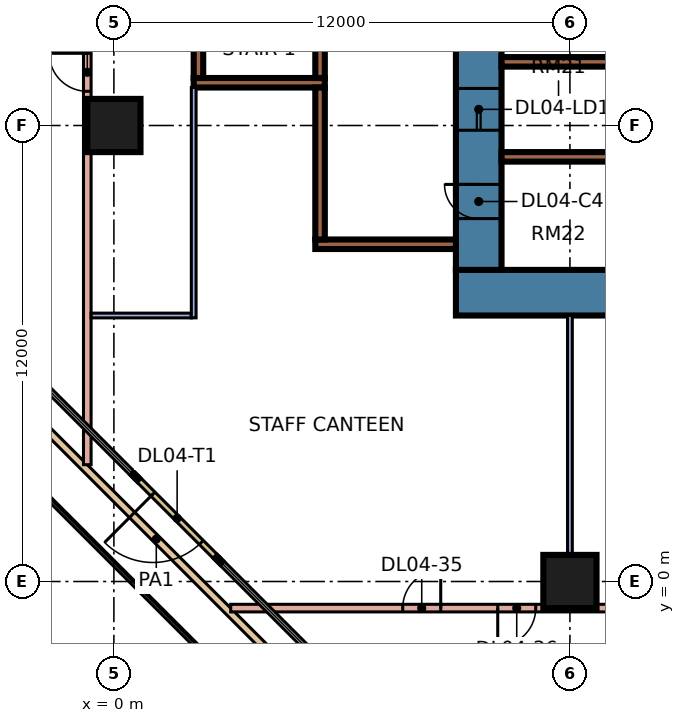
"""IFC4 building model, lengths in metres.
Left out: names, types, materials, properties, quantities, classifications, styles, units other than length and angle.
Written with IfcOpenShell. Run it as: python <this file> out.ifc"""

import sys

from ifc_helpers import new_model, si_unit, direction, frame, frame_2d, origin, origin_2d, place, context, subcontext, project, spatial, rectangle, extrude, element, fill, save


model = new_model("IFC4")
c1 = context("Model", 3, precision=1e-05, world=origin(), true_north=direction((0.0, 1.0)))
c2 = subcontext(c1, "Body", "Model", "MODEL_VIEW")
j1 = project(units=[si_unit("LENGTHUNIT", "METRE"), si_unit("PLANEANGLEUNIT", "RADIAN")], contexts=[c1])
p1 = place(None, origin())
s1 = spatial("IfcSite", under=j1, at=p1, CompositionType="ELEMENT")
p2 = place(p1, origin())
s2 = spatial("IfcBuilding", under=s1, at=p2, CompositionType="ELEMENT")
p3 = place(p2, frame((0.0, 0.0, 21.6)))
s3 = spatial("IfcBuildingStorey", under=s2, at=p3, CompositionType="ELEMENT", Elevation=21.6)
for number, where, z_axis, x_axis in (
    (1, (12.0, 0.0, 0.0), (0.0, 0.0, 1.0), (1.0, 0.0, 0.0)),
    (2, (0.0, 12.0, 0.0), (0.0, 0.0, 1.0), (1.0, 0.0, 0.0)),
):
    element("IfcColumn", number, at=place(p3, frame(where, z_axis=z_axis, x_axis=x_axis)), inside=s3, PredefinedType="COLUMN", context=c2, shape_type="SweptSolid", body=[
        extrude(rectangle(XDim=1.4, YDim=1.4, at=origin_2d()), origin(), (0.0, 0.0, 1.0), 4.8),
    ])
p4 = place(p3, frame((9.0, 7.6, 0.0), z_axis=(0.0, 0.0, 1.0), x_axis=(1.0, 0.0, 0.0)))
e3 = element("IfcWall", 3, at=p4, inside=s3, PredefinedType="SHEAR", context=c2, shape_type="SweptSolid", body=[
    extrude(rectangle(XDim=25.0, YDim=1.2, at=frame_2d((12.5, 0.0))), origin(), (0.0, 0.0, 1.0), 4.8),
])
p5 = place(p3, frame((9.6, 8.2, 0.0), z_axis=(0.0, 0.0, 1.0), x_axis=(0.0, 1.0, 0.0)))
e4 = element("IfcWall", 4, at=p5, inside=s3, PredefinedType="SHEAR", context=c2, shape_type="SweptSolid", body=[
    extrude(rectangle(XDim=10.6, YDim=1.2, at=frame_2d((5.3, 0.0))), origin(), (0.0, 0.0, 1.0), 4.8),
])
p6 = place(p5, frame((3.675, 0.0, 0.0)))
e5 = element("IfcOpeningElement", 5, at=p6, cuts=e4, PredefinedType="OPENING", context=c2, shape_type="SweptSolid", body=[
    extrude(rectangle(XDim=1.1, YDim=2.2, at=frame_2d((0.55, 1.1))), frame((0.0, 0.61, 0.0), z_axis=(0.0, -1.0, 0.0), x_axis=(1.0, 0.0, 0.0)), (0.0, 0.0, 1.0), 1.22),
])
p7 = place(p5, frame((6.175, 0.0, 0.0)))
e6 = element("IfcOpeningElement", 6, at=p7, cuts=e4, PredefinedType="OPENING", context=c2, shape_type="SweptSolid", body=[
    extrude(rectangle(XDim=1.1, YDim=2.2, at=frame_2d((0.55, 1.1))), frame((0.0, 0.61, 0.0), z_axis=(0.0, -1.0, 0.0), x_axis=(1.0, 0.0, 0.0)), (0.0, 0.0, 1.0), 1.22),
])
p8 = place(p5, frame((8.8, 0.0, 0.0)))
e7 = element("IfcOpeningElement", 7, at=p8, cuts=e4, PredefinedType="OPENING", context=c2, shape_type="SweptSolid", body=[
    extrude(rectangle(XDim=1.1, YDim=2.2, at=frame_2d((0.55, 1.1))), frame((0.0, 0.61, 0.0), z_axis=(0.0, -1.0, 0.0), x_axis=(1.0, 0.0, 0.0)), (0.0, 0.0, 1.0), 1.22),
])
p9 = place(p5, frame((1.35, 0.0, 0.0)))
e8 = element("IfcOpeningElement", 8, at=p9, cuts=e4, PredefinedType="OPENING", context=c2, shape_type="SweptSolid", body=[
    extrude(rectangle(XDim=0.9, YDim=2.1, at=frame_2d((0.45, 1.05))), frame((0.0, 0.61, 0.0), z_axis=(0.0, -1.0, 0.0), x_axis=(1.0, 0.0, 0.0)), (0.0, 0.0, 1.0), 1.22),
])
for number, where, z_axis, x_axis in (
    (9, (10.2, 11.175, 0.0), (0.0, 0.0, 1.0), (1.0, 0.0, 0.0)),
    (10, (10.2, 13.675, 0.0), (0.0, 0.0, 1.0), (1.0, 0.0, 0.0)),
):
    element("IfcWall", number, at=place(p3, frame(where, z_axis=z_axis, x_axis=x_axis)), inside=s3, PredefinedType="SHEAR", context=c2, shape_type="SweptSolid", body=[
        extrude(rectangle(XDim=3.0, YDim=0.25, at=frame_2d((1.5, 0.0))), origin(), (0.0, 0.0, 1.0), 4.8),
    ])
p10 = place(p3, frame((2.1, 13.125, 0.0), z_axis=(0.0, 0.0, 1.0), x_axis=(1.0, 0.0, 0.0)))
e11 = element("IfcWall", 11, at=p10, inside=s3, PredefinedType="SHEAR", context=c2, shape_type="SweptSolid", body=[
    extrude(rectangle(XDim=3.45, YDim=0.25, at=frame_2d((1.725, 0.0))), origin(), (0.0, 0.0, 1.0), 4.8),
])
p11 = place(p3, frame((2.225, 13.25, 0.0), z_axis=(0.0, 0.0, 1.0), x_axis=(0.0, 1.0, 0.0)))
e12 = element("IfcWall", 12, at=p11, inside=s3, PredefinedType="SHEAR", context=c2, shape_type="SweptSolid", body=[
    extrude(rectangle(XDim=6.5, YDim=0.25, at=frame_2d((3.25, 0.0))), origin(), (0.0, 0.0, 1.0), 4.8),
])
p12 = place(p3, frame((5.425, 13.25, 0.0), z_axis=(0.0, 0.0, 1.0), x_axis=(0.0, 1.0, 0.0)))
e13 = element("IfcWall", 13, at=p12, inside=s3, PredefinedType="SHEAR", context=c2, shape_type="SweptSolid", body=[
    extrude(rectangle(XDim=6.5, YDim=0.25, at=frame_2d((3.25, 0.0))), origin(), (0.0, 0.0, 1.0), 4.8),
])
p13 = place(p12, frame((5.25, 0.0, 0.0)))
e14 = element("IfcOpeningElement", 14, at=p13, cuts=e13, PredefinedType="OPENING", context=c2, shape_type="SweptSolid", body=[
    extrude(rectangle(XDim=1.1, YDim=2.2, at=frame_2d((0.55, 1.1))), frame((0.0, 0.135, 0.0), z_axis=(0.0, -1.0, 0.0), x_axis=(1.0, 0.0, 0.0)), (0.0, 0.0, 1.0), 0.27),
])
p14 = place(p3, frame((5.3, 8.875, 0.0), z_axis=(0.0, 0.0, 1.0), x_axis=(1.0, 0.0, 0.0)))
e15 = element("IfcWall", 15, at=p14, inside=s3, PredefinedType="SHEAR", context=c2, shape_type="SweptSolid", body=[
    extrude(rectangle(XDim=3.7, YDim=0.25, at=frame_2d((1.85, 0.0))), origin(), (0.0, 0.0, 1.0), 4.8),
])
p15 = place(p3, frame((5.425, 9.0, 0.0), z_axis=(0.0, 0.0, 1.0), x_axis=(0.0, 1.0, 0.0)))
e16 = element("IfcWall", 16, at=p15, inside=s3, PredefinedType="SHEAR", context=c2, shape_type="SweptSolid", body=[
    extrude(rectangle(XDim=4.0, YDim=0.25, at=frame_2d((2.0, 0.0))), origin(), (0.0, 0.0, 1.0), 4.8),
])
p16 = place(p3, frame((0.603, 2.725, 0.0), z_axis=(0.0, 0.0, 1.0), x_axis=(0.707106781187, -0.707106781187, 0.0)))
e17 = element("IfcWall", 17, at=p16, inside=s3, PredefinedType="SOLIDWALL", context=c2, shape_type="SweptSolid", body=[
    extrude(rectangle(XDim=3.0, YDim=0.15, at=frame_2d((1.5, 0.0))), origin(), (0.0, 0.0, 1.0), 4.4),
])
p17 = place(p16, frame((0.6, 0.0, 0.0)))
e18 = element("IfcOpeningElement", 18, at=p17, cuts=e17, PredefinedType="OPENING", context=c2, shape_type="SweptSolid", body=[
    extrude(rectangle(XDim=1.8, YDim=2.4, at=frame_2d((0.9, 1.2))), frame((0.0, 0.085, 0.0), z_axis=(0.0, -1.0, 0.0), x_axis=(1.0, 0.0, 0.0)), (0.0, 0.0, 1.0), 0.17),
])
p18 = place(p3, frame((9.932, -7.7, 0.0), z_axis=(0.0, 0.0, 1.0), x_axis=(-0.707106781187, 0.707106781187, 0.0)))
e19 = element("IfcWall", 19, at=p18, inside=s3, PredefinedType="PARAPET", context=c2, shape_type="SweptSolid", body=[
    extrude(rectangle(XDim=24.935, YDim=0.2, at=frame_2d((12.468, 0.0))), origin(), (0.0, 0.0, 1.0), 0.5),
])
p19 = place(p3, frame((-0.7, 3.073, 0.0), z_axis=(0.0, 0.0, 1.0), x_axis=(0.0, 1.0, 0.0)))
e20 = element("IfcWall", 20, at=p19, inside=s3, PredefinedType="PARTITIONING", context=c2, shape_type="SweptSolid", body=[
    extrude(rectangle(XDim=19.927, YDim=0.2, at=frame_2d((9.963, 0.0))), origin(), (0.0, 0.0, 1.0), 4.4),
])
p20 = place(p19, frame((17.577, 0.0, 0.0)))
e21 = element("IfcOpeningElement", 21, at=p20, cuts=e20, PredefinedType="OPENING", context=c2, shape_type="SweptSolid", body=[
    extrude(rectangle(XDim=1.8, YDim=2.1, at=frame_2d((0.9, 1.05))), frame((0.0, 0.11, 0.0), z_axis=(0.0, -1.0, 0.0), x_axis=(1.0, 0.0, 0.0)), (0.0, 0.0, 1.0), 0.22),
])
p21 = place(p19, frame((9.827, 0.0, 0.0)))
e22 = element("IfcOpeningElement", 22, at=p21, cuts=e20, PredefinedType="OPENING", context=c2, shape_type="SweptSolid", body=[
    extrude(rectangle(XDim=1.0, YDim=2.1, at=frame_2d((0.5, 1.05))), frame((0.0, 0.11, 0.0), z_axis=(0.0, -1.0, 0.0), x_axis=(1.0, 0.0, 0.0)), (0.0, 0.0, 1.0), 0.22),
])
p22 = place(p3, frame((-0.6, 7.0, 0.0), z_axis=(0.0, 0.0, 1.0), x_axis=(1.0, 0.0, 0.0)))
e23 = element("IfcWall", 23, at=p22, inside=s3, PredefinedType="PARTITIONING", context=c2, shape_type="SweptSolid", body=[
    extrude(rectangle(XDim=2.638, YDim=0.125, at=frame_2d((1.319, 0.0))), origin(), (0.0, 0.0, 1.0), 4.4),
])
p23 = place(p3, frame((2.1, 6.938, 0.0), z_axis=(0.0, 0.0, 1.0), x_axis=(0.0, 1.0, 0.0)))
e24 = element("IfcWall", 24, at=p23, inside=s3, PredefinedType="PARTITIONING", context=c2, shape_type="SweptSolid", body=[
    extrude(rectangle(XDim=6.062, YDim=0.125, at=frame_2d((3.031, 0.0))), origin(), (0.0, 0.0, 1.0), 4.4),
])
p24 = place(p3, frame((3.073, -0.7, 0.0), z_axis=(0.0, 0.0, 1.0), x_axis=(1.0, 0.0, 0.0)))
e25 = element("IfcWall", 25, at=p24, inside=s3, PredefinedType="PARTITIONING", context=c2, shape_type="SweptSolid", body=[
    extrude(rectangle(XDim=41.927, YDim=0.2, at=frame_2d((20.963, 0.0))), origin(), (0.0, 0.0, 1.0), 4.4),
])
p25 = place(p24, frame((36.027, 0.0, 0.0)))
e26 = element("IfcOpeningElement", 26, at=p25, cuts=e25, PredefinedType="OPENING", context=c2, shape_type="SweptSolid", body=[
    extrude(rectangle(XDim=1.0, YDim=2.1, at=frame_2d((0.5, 1.05))), frame((0.0, 0.11, 0.0), z_axis=(0.0, -1.0, 0.0), x_axis=(1.0, 0.0, 0.0)), (0.0, 0.0, 1.0), 0.22),
])
p26 = place(p24, frame((4.527, 0.0, 0.0)))
e27 = element("IfcOpeningElement", 27, at=p26, cuts=e25, PredefinedType="OPENING", context=c2, shape_type="SweptSolid", body=[
    extrude(rectangle(XDim=1.0, YDim=2.1, at=frame_2d((0.5, 1.05))), frame((0.0, 0.11, 0.0), z_axis=(0.0, -1.0, 0.0), x_axis=(1.0, 0.0, 0.0)), (0.0, 0.0, 1.0), 0.22),
])
p27 = place(p24, frame((7.027, 0.0, 0.0)))
e28 = element("IfcOpeningElement", 28, at=p27, cuts=e25, PredefinedType="OPENING", context=c2, shape_type="SweptSolid", body=[
    extrude(rectangle(XDim=1.0, YDim=2.1, at=frame_2d((0.5, 1.05))), frame((0.0, 0.11, 0.0), z_axis=(0.0, -1.0, 0.0), x_axis=(1.0, 0.0, 0.0)), (0.0, 0.0, 1.0), 0.22),
])
p28 = place(p24, frame((14.527, 0.0, 0.0)))
e29 = element("IfcOpeningElement", 29, at=p28, cuts=e25, PredefinedType="OPENING", context=c2, shape_type="SweptSolid", body=[
    extrude(rectangle(XDim=1.0, YDim=2.1, at=frame_2d((0.5, 1.05))), frame((0.0, 0.11, 0.0), z_axis=(0.0, -1.0, 0.0), x_axis=(1.0, 0.0, 0.0)), (0.0, 0.0, 1.0), 0.22),
])
p29 = place(p24, frame((25.527, 0.0, 0.0)))
e30 = element("IfcOpeningElement", 30, at=p29, cuts=e25, PredefinedType="OPENING", context=c2, shape_type="SweptSolid", body=[
    extrude(rectangle(XDim=1.0, YDim=2.1, at=frame_2d((0.5, 1.05))), frame((0.0, 0.11, 0.0), z_axis=(0.0, -1.0, 0.0), x_axis=(1.0, 0.0, 0.0)), (0.0, 0.0, 1.0), 0.22),
])
p30 = place(p3, frame((12.0, -0.6, 0.0), z_axis=(0.0, 0.0, 1.0), x_axis=(0.0, 1.0, 0.0)))
e31 = element("IfcWall", 31, at=p30, inside=s3, PredefinedType="PARTITIONING", context=c2, shape_type="SweptSolid", body=[
    extrude(rectangle(XDim=7.6, YDim=0.125, at=frame_2d((3.8, 0.0))), origin(), (0.0, 0.0, 1.0), 4.4),
])
p31 = place(p17, frame((1.8, 0.0, 0.0), z_axis=(0.0, 0.0, 1.0), x_axis=(-1.0, 0.0, 0.0)))
e32 = element("IfcDoor", 32, at=p31, inside=s3, OperationType="DOUBLE_DOOR_SINGLE_SWING", PredefinedType="DOOR", context=c2, shape_type="SweptSolid", body=[
    extrude(rectangle(XDim=1.8, YDim=2.4, at=frame_2d((0.9, 1.2))), frame((0.0, 0.025, 0.0), z_axis=(0.0, -1.0, 0.0), x_axis=(1.0, 0.0, 0.0)), (0.0, 0.0, 1.0), 0.05),
])
fill(e18, e32)
p32 = place(p6, origin())
e33 = element("IfcDoor", 33, at=p32, inside=s3, OperationType="DOUBLE_DOOR_SLIDING", PredefinedType="DOOR", context=c2, shape_type="SweptSolid", body=[
    extrude(rectangle(XDim=1.1, YDim=2.2, at=frame_2d((0.55, 1.1))), frame((0.0, 0.025, 0.0), z_axis=(0.0, -1.0, 0.0), x_axis=(1.0, 0.0, 0.0)), (0.0, 0.0, 1.0), 0.05),
])
fill(e5, e33)
p33 = place(p9, frame((0.9, 0.0, 0.0), z_axis=(0.0, 0.0, 1.0), x_axis=(-1.0, 0.0, 0.0)))
e34 = element("IfcDoor", 34, at=p33, inside=s3, OperationType="SINGLE_SWING_RIGHT", PredefinedType="DOOR", context=c2, shape_type="SweptSolid", body=[
    extrude(rectangle(XDim=0.9, YDim=2.1, at=frame_2d((0.45, 1.05))), frame((0.0, 0.025, 0.0), z_axis=(0.0, -1.0, 0.0), x_axis=(1.0, 0.0, 0.0)), (0.0, 0.0, 1.0), 0.05),
])
fill(e8, e34)
p34 = place(p21, frame((1.0, 0.0, 0.0), z_axis=(0.0, 0.0, 1.0), x_axis=(-1.0, 0.0, 0.0)))
e35 = element("IfcDoor", 35, at=p34, inside=s3, OperationType="SINGLE_SWING_RIGHT", PredefinedType="DOOR", context=c2, shape_type="SweptSolid", body=[
    extrude(rectangle(XDim=1.0, YDim=2.1, at=frame_2d((0.5, 1.05))), frame((0.0, 0.025, 0.0), z_axis=(0.0, -1.0, 0.0), x_axis=(1.0, 0.0, 0.0)), (0.0, 0.0, 1.0), 0.05),
])
fill(e22, e35)
p35 = place(p26, frame((1.0, 0.0, 0.0), z_axis=(0.0, 0.0, 1.0), x_axis=(-1.0, 0.0, 0.0)))
e36 = element("IfcDoor", 36, at=p35, inside=s3, OperationType="SINGLE_SWING_RIGHT", PredefinedType="DOOR", context=c2, shape_type="SweptSolid", body=[
    extrude(rectangle(XDim=1.0, YDim=2.1, at=frame_2d((0.5, 1.05))), frame((0.0, 0.025, 0.0), z_axis=(0.0, -1.0, 0.0), x_axis=(1.0, 0.0, 0.0)), (0.0, 0.0, 1.0), 0.05),
])
fill(e27, e36)
p36 = place(p27, frame((1.0, 0.0, 0.0), z_axis=(0.0, 0.0, 1.0), x_axis=(-1.0, 0.0, 0.0)))
e37 = element("IfcDoor", 37, at=p36, inside=s3, OperationType="SINGLE_SWING_LEFT", PredefinedType="DOOR", context=c2, shape_type="SweptSolid", body=[
    extrude(rectangle(XDim=1.0, YDim=2.1, at=frame_2d((0.5, 1.05))), frame((0.0, 0.025, 0.0), z_axis=(0.0, -1.0, 0.0), x_axis=(1.0, 0.0, 0.0)), (0.0, 0.0, 1.0), 0.05),
])
fill(e28, e37)
save(model, sys.argv[1])
